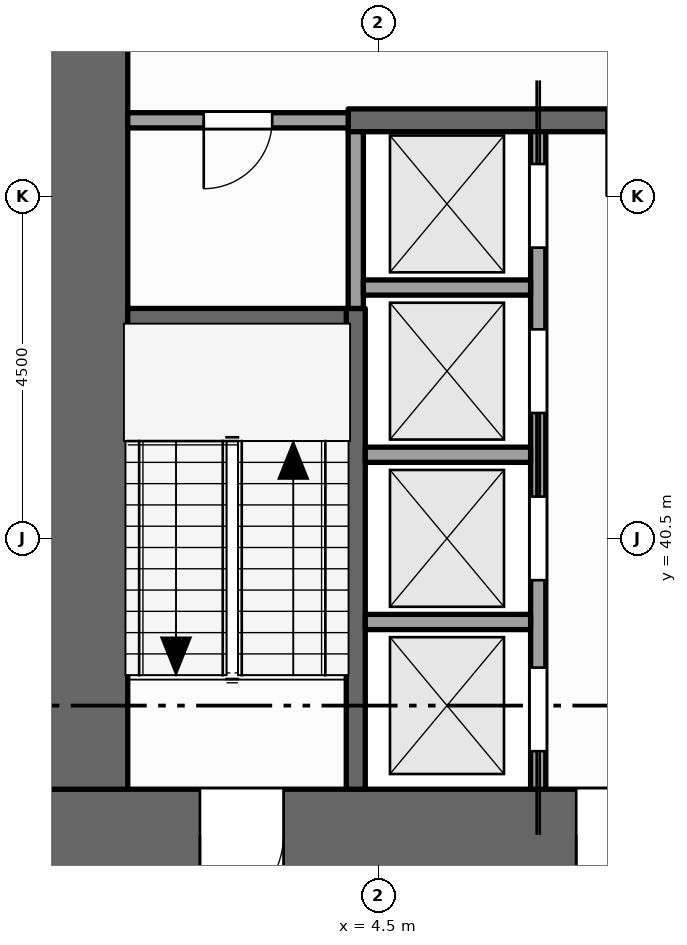
"""IFC4 building model, lengths in metres.
Left out: names, types, materials, properties, quantities, classifications, styles, units other than length and angle.
Written with IfcOpenShell. Run it as: python <this file> out.ifc"""

import sys

from ifc_helpers import new_model, si_unit, direction, frame, frame_2d, origin, place, context, subcontext, project, spatial, rectangle, extrude, element, fill, save


model = new_model("IFC4")
c1 = context("Model", 3, precision=1e-05, world=origin(), true_north=direction((0.0, 1.0)))
c2 = subcontext(c1, "Body", "Model", "MODEL_VIEW")
j1 = project(units=[si_unit("LENGTHUNIT", "METRE"), si_unit("PLANEANGLEUNIT", "RADIAN")], contexts=[c1])
p1 = place(None, origin())
s1 = spatial("IfcSite", under=j1, at=p1, CompositionType="ELEMENT")
p2 = place(p1, origin())
s2 = spatial("IfcBuilding", under=s1, at=p2, CompositionType="ELEMENT")
p3 = place(p2, frame((0.0, 0.0, 107.0)))
s3 = spatial("IfcBuildingStorey", under=s2, at=p3, CompositionType="ELEMENT", Elevation=107.0)
p4 = place(p3, frame((0.0, 36.6, -0.15), z_axis=(0.0, 0.0, 1.0), x_axis=(1.0, 0.0, 0.0)))
e1 = element("IfcWall", 1, at=p4, inside=s3, PredefinedType="SHEAR", context=c2, shape_type="SweptSolid", body=[
    extrude(rectangle(XDim=22.5, YDim=1.2, at=frame_2d((11.25, 0.0))), origin(), (0.0, 0.0, 1.0), 4.0),
])
p5 = place(p4, frame((7.1, 0.0, 0.15)))
e2 = element("IfcOpeningElement", 2, at=p5, cuts=e1, PredefinedType="OPENING", context=c2, shape_type="SweptSolid", body=[
    extrude(rectangle(XDim=1.8, YDim=2.1, at=frame_2d((0.9, 1.05))), frame((0.0, 0.61, 0.0), z_axis=(0.0, -1.0, 0.0), x_axis=(1.0, 0.0, 0.0)), (0.0, 0.0, 1.0), 1.22),
])
p6 = place(p4, frame((13.15, 0.0, 0.15)))
e3 = element("IfcOpeningElement", 3, at=p6, cuts=e1, PredefinedType="OPENING", context=c2, shape_type="SweptSolid", body=[
    extrude(rectangle(XDim=1.1, YDim=2.1, at=frame_2d((0.55, 1.05))), frame((0.0, 0.61, 0.0), z_axis=(0.0, -1.0, 0.0), x_axis=(1.0, 0.0, 0.0)), (0.0, 0.0, 1.0), 1.22),
])
p7 = place(p4, frame((2.15, 0.0, 0.15)))
e4 = element("IfcOpeningElement", 4, at=p7, cuts=e1, PredefinedType="OPENING", context=c2, shape_type="SweptSolid", body=[
    extrude(rectangle(XDim=1.1, YDim=2.1, at=frame_2d((0.55, 1.05))), frame((0.0, 0.61, 0.0), z_axis=(0.0, -1.0, 0.0), x_axis=(1.0, 0.0, 0.0)), (0.0, 0.0, 1.0), 1.22),
])
p8 = place(p4, frame((19.35, 0.0, 0.15)))
e5 = element("IfcOpeningElement", 5, at=p8, cuts=e1, PredefinedType="OPENING", context=c2, shape_type="SweptSolid", body=[
    extrude(rectangle(XDim=1.1, YDim=2.1, at=frame_2d((0.55, 1.05))), frame((0.0, 0.61, 0.0), z_axis=(0.0, -1.0, 0.0), x_axis=(1.0, 0.0, 0.0)), (0.0, 0.0, 1.0), 1.22),
])
p9 = place(p3, frame((0.6, 37.2, -0.15), z_axis=(0.0, 0.0, 1.0), x_axis=(0.0, 1.0, 0.0)))
e6 = element("IfcWall", 6, at=p9, inside=s3, PredefinedType="SHEAR", context=c2, shape_type="SweptSolid", body=[
    extrude(rectangle(XDim=11.1, YDim=1.2, at=frame_2d((5.55, 0.0))), origin(), (0.0, 0.0, 1.0), 4.0),
])
p10 = place(p3, frame((4.2, 37.2, 0.0), z_axis=(0.0, 0.0, 1.0), x_axis=(0.0, 1.0, 0.0)))
e7 = element("IfcWall", 7, at=p10, inside=s3, PredefinedType="SHEAR", context=c2, shape_type="SweptSolid", body=[
    extrude(rectangle(XDim=6.325, YDim=0.25, at=frame_2d((3.163, 0.0))), origin(), (0.0, 0.0, 1.0), 3.85),
])
p11 = place(p3, frame((4.2, 43.525, 0.0), z_axis=(0.0, 0.0, 1.0), x_axis=(0.0, 1.0, 0.0)))
e8 = element("IfcWall", 8, at=p11, inside=s3, PredefinedType="SOLIDWALL", context=c2, shape_type="SweptSolid", body=[
    extrude(rectangle(XDim=2.325, YDim=0.2, at=frame_2d((1.163, 0.0))), origin(), (0.0, 0.0, 1.0), 3.85),
])
p12 = place(p3, frame((6.6, 37.2, 0.0), z_axis=(0.0, 0.0, 1.0), x_axis=(0.0, 1.0, 0.0)))
e9 = element("IfcWall", 9, at=p12, inside=s3, PredefinedType="SOLIDWALL", context=c2, shape_type="SweptSolid", body=[
    extrude(rectangle(XDim=8.65, YDim=0.2, at=frame_2d((4.325, 0.0))), origin(), (0.0, 0.0, 1.0), 3.85),
])
p13 = place(p12, frame((0.5, 0.0, 0.012)))
e10 = element("IfcOpeningElement", 10, at=p13, cuts=e9, PredefinedType="OPENING", context=c2, shape_type="SweptSolid", body=[
    extrude(rectangle(XDim=1.1, YDim=2.1, at=frame_2d((0.55, 1.05))), frame((0.0, 0.11, 0.0), z_axis=(0.0, -1.0, 0.0), x_axis=(1.0, 0.0, 0.0)), (0.0, 0.0, 1.0), 0.22),
])
p14 = place(p12, frame((2.75, 0.0, 0.012)))
e11 = element("IfcOpeningElement", 11, at=p14, cuts=e9, PredefinedType="OPENING", context=c2, shape_type="SweptSolid", body=[
    extrude(rectangle(XDim=1.1, YDim=2.1, at=frame_2d((0.55, 1.05))), frame((0.0, 0.11, 0.0), z_axis=(0.0, -1.0, 0.0), x_axis=(1.0, 0.0, 0.0)), (0.0, 0.0, 1.0), 0.22),
])
p15 = place(p12, frame((4.95, 0.0, 0.012)))
e12 = element("IfcOpeningElement", 12, at=p15, cuts=e9, PredefinedType="OPENING", context=c2, shape_type="SweptSolid", body=[
    extrude(rectangle(XDim=1.1, YDim=2.1, at=frame_2d((0.55, 1.05))), frame((0.0, 0.11, 0.0), z_axis=(0.0, -1.0, 0.0), x_axis=(1.0, 0.0, 0.0)), (0.0, 0.0, 1.0), 0.22),
])
p16 = place(p12, frame((7.125, 0.0, 0.012)))
e13 = element("IfcOpeningElement", 13, at=p16, cuts=e9, PredefinedType="OPENING", context=c2, shape_type="SweptSolid", body=[
    extrude(rectangle(XDim=1.1, YDim=2.1, at=frame_2d((0.55, 1.05))), frame((0.0, 0.11, 0.0), z_axis=(0.0, -1.0, 0.0), x_axis=(1.0, 0.0, 0.0)), (0.0, 0.0, 1.0), 0.22),
])
for number, where, z_axis, x_axis in (
    (14, (4.325, 39.4, 0.0), (0.0, 0.0, 1.0), (1.0, 0.0, 0.0)),
    (15, (4.325, 41.6, 0.0), (0.0, 0.0, 1.0), (1.0, 0.0, 0.0)),
):
    element("IfcWall", number, at=place(p3, frame(where, z_axis=z_axis, x_axis=x_axis)), inside=s3, PredefinedType="SOLIDWALL", context=c2, shape_type="SweptSolid", body=[
        extrude(rectangle(XDim=2.175, YDim=0.2, at=frame_2d((1.087, 0.0))), origin(), (0.0, 0.0, 1.0), 3.85),
    ])
p17 = place(p3, frame((1.2, 43.4, 0.0), z_axis=(0.0, 0.0, 1.0), x_axis=(1.0, 0.0, 0.0)))
e16 = element("IfcWall", 16, at=p17, inside=s3, PredefinedType="SHEAR", context=c2, shape_type="SweptSolid", body=[
    extrude(rectangle(XDim=2.875, YDim=0.25, at=frame_2d((1.438, 0.0))), origin(), (0.0, 0.0, 1.0), 3.85),
])
p18 = place(p3, frame((4.3, 43.8, 0.0), z_axis=(0.0, 0.0, 1.0), x_axis=(1.0, 0.0, 0.0)))
e17 = element("IfcWall", 17, at=p18, inside=s3, PredefinedType="SOLIDWALL", context=c2, shape_type="SweptSolid", body=[
    extrude(rectangle(XDim=2.2, YDim=0.2, at=frame_2d((1.1, 0.0))), origin(), (0.0, 0.0, 1.0), 3.85),
])
p19 = place(p3, frame((1.2, 46.0, 0.0), z_axis=(0.0, 0.0, 1.0), x_axis=(1.0, 0.0, 0.0)))
e18 = element("IfcWall", 18, at=p19, inside=s3, PredefinedType="PARTITIONING", context=c2, shape_type="SweptSolid", body=[
    extrude(rectangle(XDim=2.9, YDim=0.2, at=frame_2d((1.45, 0.0))), origin(), (0.0, 0.0, 1.0), 3.85),
])
p20 = place(p19, frame((1.0, 0.0, 0.0)))
e19 = element("IfcOpeningElement", 19, at=p20, cuts=e18, PredefinedType="OPENING", context=c2, shape_type="SweptSolid", body=[
    extrude(rectangle(XDim=0.9, YDim=2.1, at=frame_2d((0.45, 1.05))), frame((0.0, 0.11, 0.0), z_axis=(0.0, -1.0, 0.0), x_axis=(1.0, 0.0, 0.0)), (0.0, 0.0, 1.0), 0.22),
])
p21 = place(p3, frame((4.1, 46.0, 0.0), z_axis=(0.0, 0.0, 1.0), x_axis=(1.0, 0.0, 0.0)))
e20 = element("IfcWall", 20, at=p21, inside=s3, PredefinedType="SHEAR", context=c2, shape_type="SweptSolid", body=[
    extrude(rectangle(XDim=14.5, YDim=0.3, at=frame_2d((7.25, 0.0))), origin(), (0.0, 0.0, 1.0), 3.85),
])
p22 = place(p21, frame((3.4, 0.0, 0.0)))
e21 = element("IfcOpeningElement", 21, at=p22, cuts=e20, PredefinedType="OPENING", context=c2, shape_type="SweptSolid", body=[
    extrude(rectangle(XDim=1.0, YDim=2.1, at=frame_2d((0.5, 1.05))), frame((0.0, 0.16, 0.0), z_axis=(0.0, -1.0, 0.0), x_axis=(1.0, 0.0, 0.0)), (0.0, 0.0, 1.0), 0.32),
])
p23 = place(p21, frame((9.1, 0.0, 0.0)))
e22 = element("IfcOpeningElement", 22, at=p23, cuts=e20, PredefinedType="OPENING", context=c2, shape_type="SweptSolid", body=[
    extrude(rectangle(XDim=1.0, YDim=2.1, at=frame_2d((0.5, 1.05))), frame((0.0, 0.16, 0.0), z_axis=(0.0, -1.0, 0.0), x_axis=(1.0, 0.0, 0.0)), (0.0, 0.0, 1.0), 0.32),
])
p24 = place(p13, origin())
e23 = element("IfcDoor", 23, at=p24, inside=s3, OperationType="SLIDING_TO_LEFT", PredefinedType="DOOR", context=c2, shape_type="SweptSolid", body=[
    extrude(rectangle(XDim=1.1, YDim=2.1, at=frame_2d((0.55, 1.05))), frame((0.0, 0.025, 0.0), z_axis=(0.0, -1.0, 0.0), x_axis=(1.0, 0.0, 0.0)), (0.0, 0.0, 1.0), 0.05),
])
fill(e10, e23)
p25 = place(p14, origin())
e24 = element("IfcDoor", 24, at=p25, inside=s3, OperationType="SLIDING_TO_RIGHT", PredefinedType="DOOR", context=c2, shape_type="SweptSolid", body=[
    extrude(rectangle(XDim=1.1, YDim=2.1, at=frame_2d((0.55, 1.05))), frame((0.0, 0.025, 0.0), z_axis=(0.0, -1.0, 0.0), x_axis=(1.0, 0.0, 0.0)), (0.0, 0.0, 1.0), 0.05),
])
fill(e11, e24)
p26 = place(p15, origin())
e25 = element("IfcDoor", 25, at=p26, inside=s3, OperationType="SLIDING_TO_LEFT", PredefinedType="DOOR", context=c2, shape_type="SweptSolid", body=[
    extrude(rectangle(XDim=1.1, YDim=2.1, at=frame_2d((0.55, 1.05))), frame((0.0, 0.025, 0.0), z_axis=(0.0, -1.0, 0.0), x_axis=(1.0, 0.0, 0.0)), (0.0, 0.0, 1.0), 0.05),
])
fill(e12, e25)
p27 = place(p16, origin())
e26 = element("IfcDoor", 26, at=p27, inside=s3, OperationType="SLIDING_TO_RIGHT", PredefinedType="DOOR", context=c2, shape_type="SweptSolid", body=[
    extrude(rectangle(XDim=1.1, YDim=2.1, at=frame_2d((0.55, 1.05))), frame((0.0, 0.025, 0.0), z_axis=(0.0, -1.0, 0.0), x_axis=(1.0, 0.0, 0.0)), (0.0, 0.0, 1.0), 0.05),
])
fill(e13, e26)
p28 = place(p5, origin())
e27 = element("IfcDoor", 27, at=p28, inside=s3, OperationType="DOUBLE_DOOR_SINGLE_SWING", PredefinedType="DOOR", context=c2, shape_type="SweptSolid", body=[
    extrude(rectangle(XDim=1.8, YDim=2.1, at=frame_2d((0.9, 1.05))), frame((0.0, 0.025, 0.0), z_axis=(0.0, -1.0, 0.0), x_axis=(1.0, 0.0, 0.0)), (0.0, 0.0, 1.0), 0.05),
])
fill(e2, e27)
p29 = place(p7, origin())
e28 = element("IfcDoor", 28, at=p29, inside=s3, OperationType="SINGLE_SWING_LEFT", PredefinedType="DOOR", context=c2, shape_type="SweptSolid", body=[
    extrude(rectangle(XDim=1.1, YDim=2.1, at=frame_2d((0.55, 1.05))), frame((0.0, 0.025, 0.0), z_axis=(0.0, -1.0, 0.0), x_axis=(1.0, 0.0, 0.0)), (0.0, 0.0, 1.0), 0.05),
])
fill(e4, e28)
p30 = place(p20, origin())
e29 = element("IfcDoor", 29, at=p30, inside=s3, OperationType="SINGLE_SWING_LEFT", PredefinedType="DOOR", context=c2, shape_type="SweptSolid", body=[
    extrude(rectangle(XDim=0.9, YDim=2.1, at=frame_2d((0.45, 1.05))), frame((0.0, 0.025, 0.0), z_axis=(0.0, -1.0, 0.0), x_axis=(1.0, 0.0, 0.0)), (0.0, 0.0, 1.0), 0.05),
])
fill(e19, e29)
save(model, sys.argv[1])
